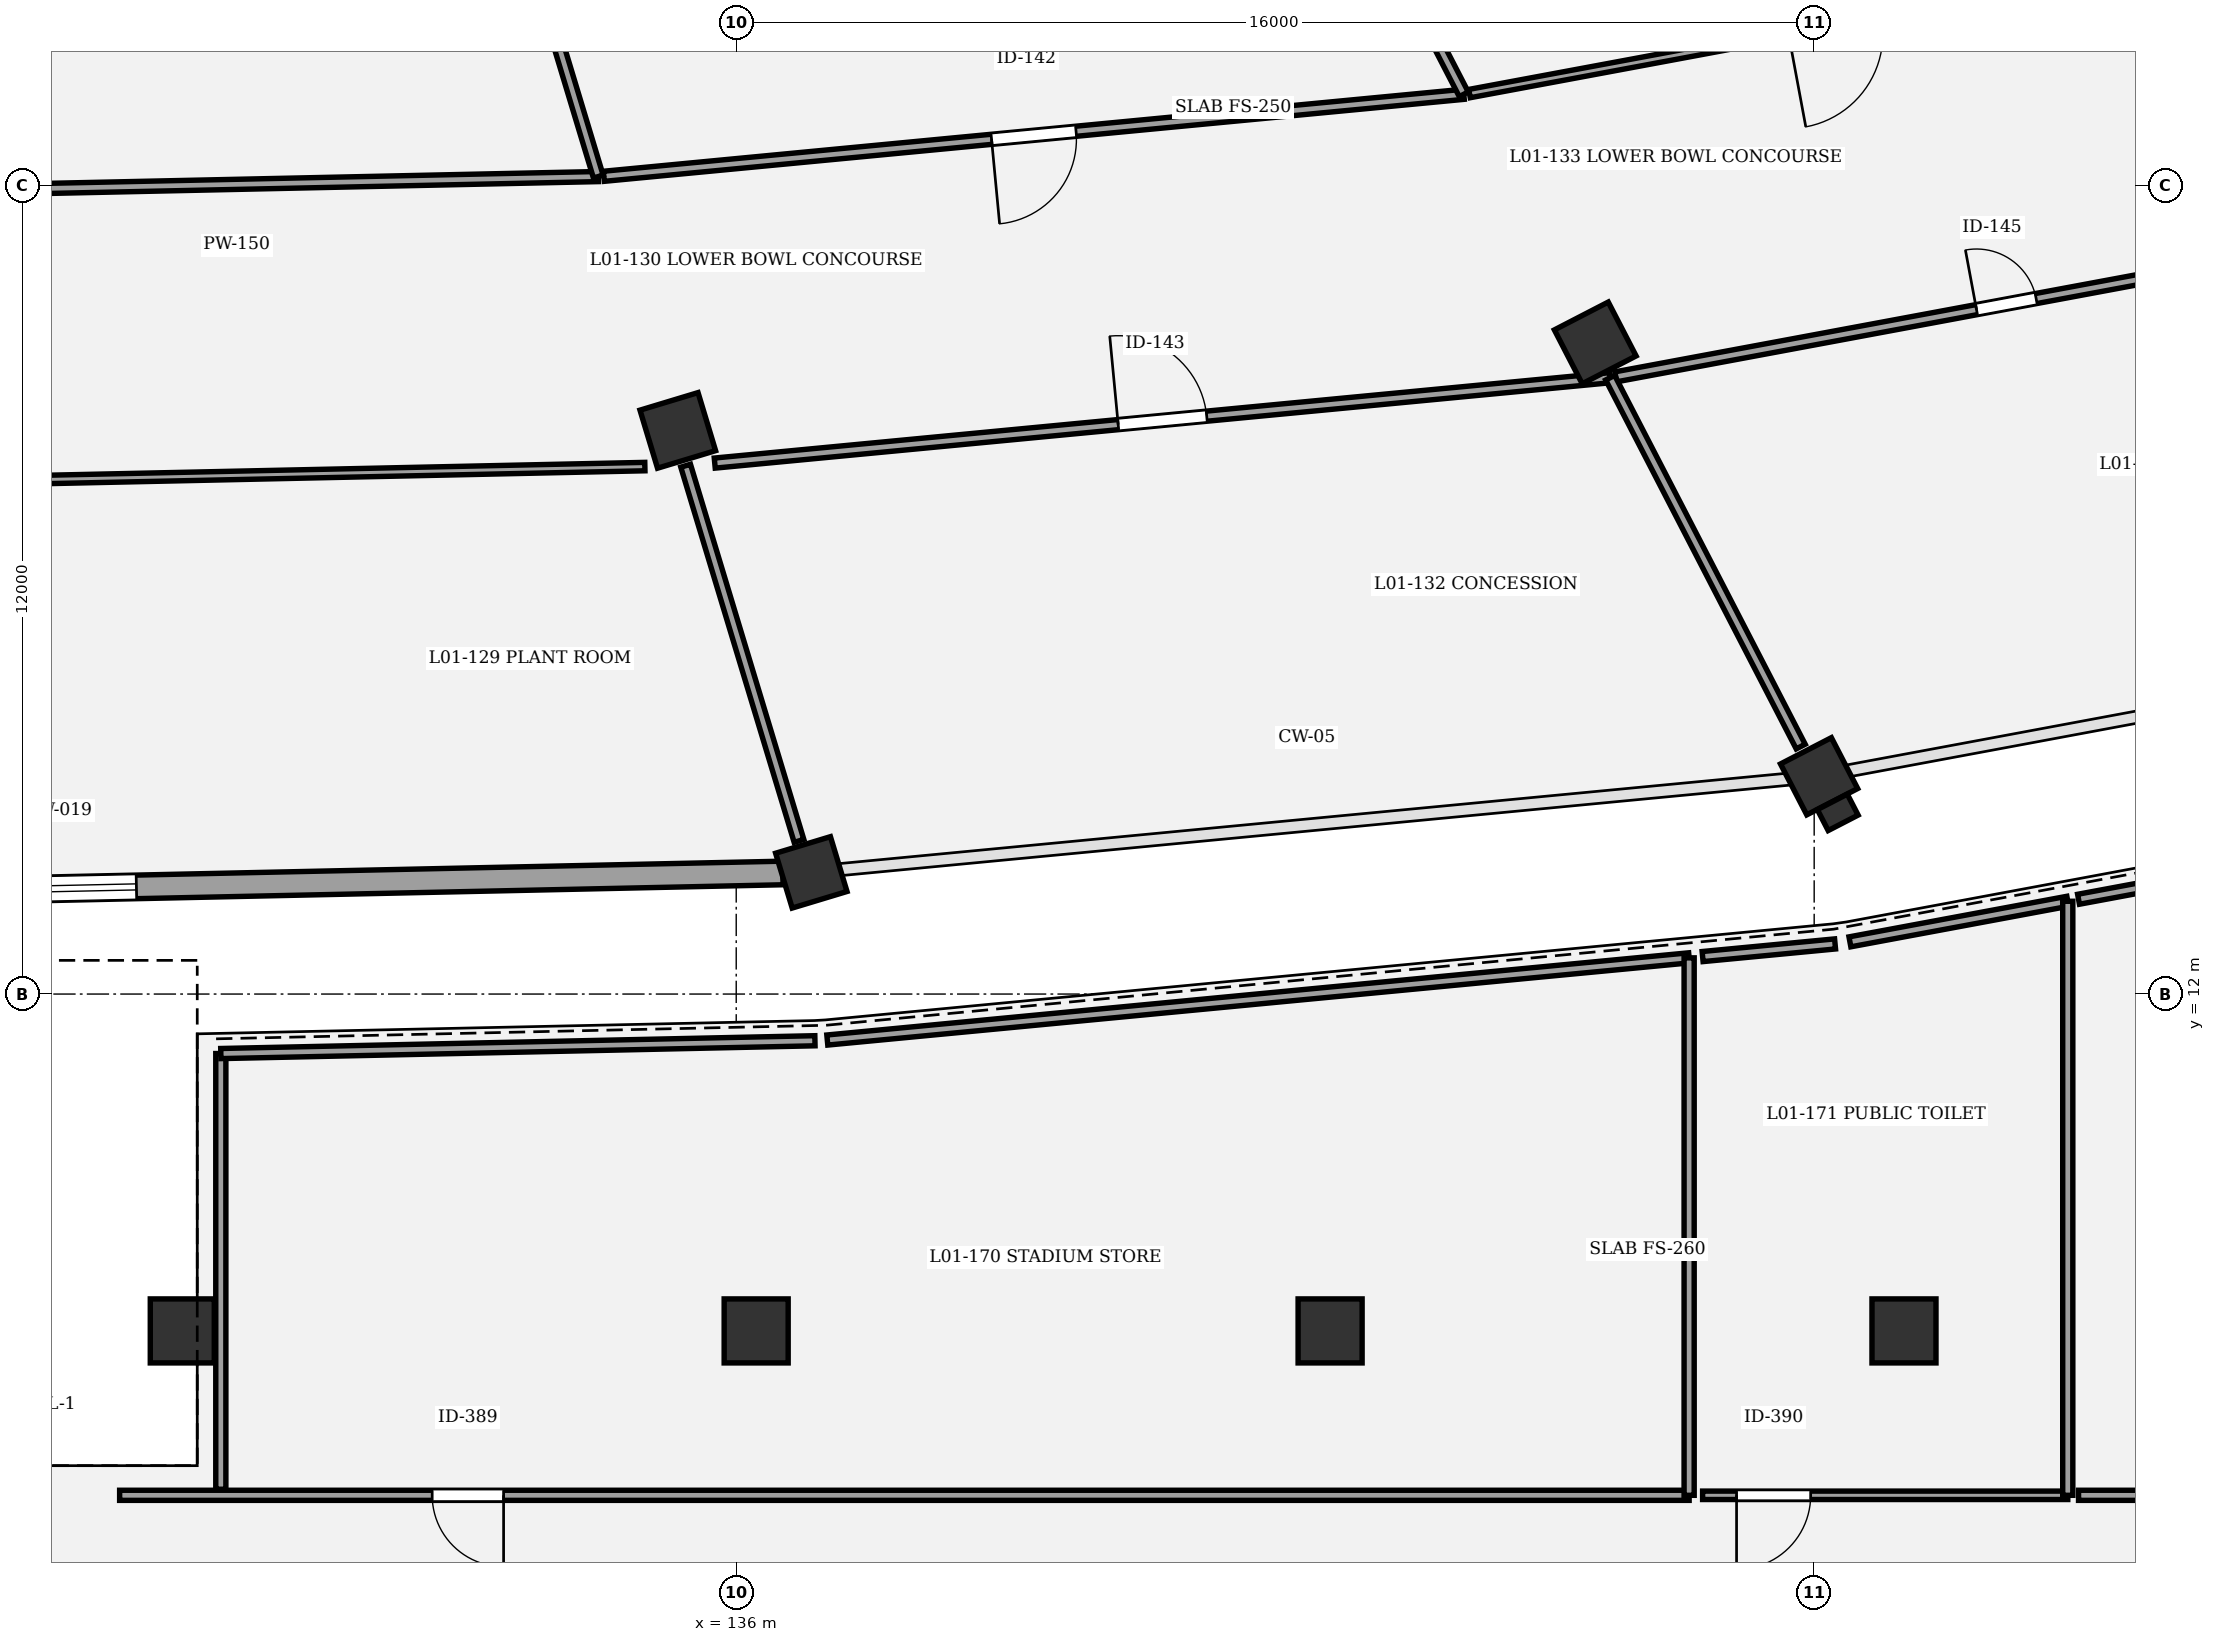
"""IFC4 building model, lengths in metres.
Left out: names, types, materials, properties, quantities, classifications, styles, units other than length and angle.
Written with IfcOpenShell. Run it as: python <this file> out.ifc"""

import sys

from ifc_helpers import new_model, si_unit, direction, frame, frame_2d, origin, origin_2d, place, context, subcontext, project, spatial, rectangle, circle, extrude, element, fill, save


model = new_model("IFC4")
c1 = context("Model", 3, precision=1e-05, world=origin(), true_north=direction((0.0, 1.0)))
c2 = subcontext(c1, "Body", "Model", "MODEL_VIEW")
j1 = project(units=[si_unit("LENGTHUNIT", "METRE"), si_unit("PLANEANGLEUNIT", "RADIAN")], contexts=[c1])
p1 = place(None, origin())
s1 = spatial("IfcSite", under=j1, at=p1, CompositionType="ELEMENT")
p2 = place(p1, origin())
s2 = spatial("IfcBuilding", under=s1, at=p2, CompositionType="ELEMENT")
p3 = place(p2, frame((0.0, 0.0, 5.4)))
s3 = spatial("IfcBuildingStorey", under=s2, at=p3, CompositionType="ELEMENT", Elevation=5.4)
p4 = place(p3, frame((135.133, 20.366, 0.0), z_axis=(0.0, 0.0, 1.0), x_axis=(0.289198876314, -0.957269037387, 0.0)))
e1 = element("IfcColumn", 1, at=p4, inside=s3, PredefinedType="COLUMN", context=c2, shape_type="SweptSolid", body=[
    extrude(rectangle(XDim=0.9, YDim=0.9, at=origin_2d()), origin(), (0.0, 0.0, 1.0), 4.8),
])
p5 = place(p3, frame((137.115, 13.806, 0.0), z_axis=(0.0, 0.0, 1.0), x_axis=(0.289198876314, -0.957269037387, 0.0)))
e2 = element("IfcColumn", 2, at=p5, inside=s3, PredefinedType="COLUMN", context=c2, shape_type="SweptSolid", body=[
    extrude(rectangle(XDim=0.85, YDim=0.85, at=origin_2d()), origin(), (0.0, 0.0, 1.0), 4.8),
])
p6 = place(p3, frame((148.75, 21.665, 0.0), z_axis=(0.0, 0.0, 1.0), x_axis=(0.458959712465, -0.888457079624, 0.0)))
e3 = element("IfcColumn", 3, at=p6, inside=s3, PredefinedType="COLUMN", context=c2, shape_type="SweptSolid", body=[
    extrude(rectangle(XDim=0.9, YDim=0.9, at=origin_2d()), origin(), (0.0, 0.0, 1.0), 4.8),
])
p7 = place(p3, frame((152.073, 15.233, 0.0), z_axis=(0.0, 0.0, 1.0), x_axis=(0.458959712465, -0.888457079624, 0.0)))
e4 = element("IfcColumn", 4, at=p7, inside=s3, PredefinedType="COLUMN", context=c2, shape_type="SweptSolid", body=[
    extrude(rectangle(XDim=0.85, YDim=0.85, at=origin_2d()), origin(), (0.0, 0.0, 1.0), 4.8),
])
p8 = place(p3, frame((152.35, 14.697, 0.0), z_axis=(0.0, 0.0, 1.0), x_axis=(0.888457079624, 0.458959712465, 0.0)))
e5 = element("IfcColumn", 5, at=p8, inside=s3, PredefinedType="PILASTER", context=c2, shape_type="SweptSolid", body=[
    extrude(rectangle(XDim=0.5, YDim=0.35, at=origin_2d()), origin(), (0.0, 0.0, 1.0), 4.8),
])
for number, where, z_axis, x_axis in (
    (6, (127.778, 7.0, 0.0), (0.0, 0.0, 1.0), (1.0, 0.0, 0.0)),
    (7, (136.296, 7.0, 0.0), (0.0, 0.0, 1.0), (1.0, 0.0, 0.0)),
    (8, (144.815, 7.0, 0.0), (0.0, 0.0, 1.0), (1.0, 0.0, 0.0)),
    (9, (153.333, 7.0, 0.0), (0.0, 0.0, 1.0), (1.0, 0.0, 0.0)),
):
    element("IfcColumn", number, at=place(p3, frame(where, z_axis=z_axis, x_axis=x_axis)), inside=s3, PredefinedType="COLUMN", context=c2, shape_type="SweptSolid", body=[
        extrude(circle(Radius=0.475, at=origin_2d()), origin(), (0.0, 0.0, 1.0), 4.8),
    ])
p9 = place(p3, frame((115.423, 13.339, 0.0), z_axis=(0.0, 0.0, 1.0), x_axis=(0.999768218464, 0.021529267282, 0.0)))
e10 = element("IfcWall", 10, at=p9, inside=s3, PredefinedType="STANDARD", context=c2, shape_type="SweptSolid", body=[
    extrude(rectangle(XDim=21.274, YDim=0.35, at=frame_2d((10.637, 0.0))), origin(), (0.0, 0.0, 1.0), 3.57),
])
p10 = place(p9, frame((9.597, 0.0, 0.9)))
e11 = element("IfcOpeningElement", 11, at=p10, cuts=e10, PredefinedType="OPENING", context=c2, shape_type="SweptSolid", body=[
    extrude(rectangle(XDim=2.08, YDim=1.75, at=frame_2d((1.04, 0.875))), frame((0.0, 0.185, 0.0), z_axis=(0.0, -1.0, 0.0), x_axis=(1.0, 0.0, 0.0)), (0.0, 0.0, 1.0), 0.37),
])
p11 = place(p3, frame((133.953, 24.134, 0.0), z_axis=(0.0, 0.0, 1.0), x_axis=(-0.999768266483, -0.021527037261, 0.0)))
e12 = element("IfcWall", 12, at=p11, inside=s3, PredefinedType="PARTITIONING", context=c2, shape_type="SweptSolid", body=[
    extrude(rectangle(XDim=18.917, YDim=0.15, at=frame_2d((9.458, 0.0))), origin(), (0.0, 0.0, 1.0), 3.55),
])
p12 = place(p11, frame((8.868, 0.0, 0.0)))
e13 = element("IfcOpeningElement", 13, at=p12, cuts=e12, PredefinedType="OPENING", context=c2, shape_type="SweptSolid", body=[
    extrude(rectangle(XDim=1.18, YDim=2.3, at=frame_2d((0.59, 1.15))), frame((0.0, 0.085, 0.0), z_axis=(0.0, -1.0, 0.0), x_axis=(1.0, 0.0, 0.0)), (0.0, 0.0, 1.0), 0.17),
])
p13 = place(p3, frame((115.511, 19.417, 0.0), z_axis=(0.0, 0.0, 1.0), x_axis=(0.999768107727, 0.021534409017, 0.0)))
e14 = element("IfcWall", 14, at=p13, inside=s3, PredefinedType="PARTITIONING", context=c2, shape_type="SweptSolid", body=[
    extrude(rectangle(XDim=19.137, YDim=0.125, at=frame_2d((9.569, 0.0))), origin(), (0.0, 0.0, 1.0), 3.55),
])
p14 = place(p13, frame((8.959, 0.0, 0.0)))
e15 = element("IfcOpeningElement", 15, at=p14, cuts=e14, PredefinedType="OPENING", context=c2, shape_type="SweptSolid", body=[
    extrude(rectangle(XDim=1.22, YDim=2.3, at=frame_2d((0.61, 1.15))), frame((0.0, 0.073, 0.0), z_axis=(0.0, -1.0, 0.0), x_axis=(1.0, 0.0, 0.0)), (0.0, 0.0, 1.0), 0.145),
])
p15 = place(p3, frame((146.799, 25.355, 0.0), z_axis=(0.0, 0.0, 1.0), x_axis=(-0.995485111947, -0.094917816515, 0.0)))
e16 = element("IfcWall", 16, at=p15, inside=s3, PredefinedType="PARTITIONING", context=c2, shape_type="SweptSolid", body=[
    extrude(rectangle(XDim=12.822, YDim=0.15, at=frame_2d((6.411, 0.0))), origin(), (0.0, 0.0, 1.0), 3.55),
])
p16 = place(p15, frame((5.781, 0.0, 0.0)))
e17 = element("IfcOpeningElement", 17, at=p16, cuts=e16, PredefinedType="OPENING", context=c2, shape_type="SweptSolid", body=[
    extrude(rectangle(XDim=1.26, YDim=2.3, at=frame_2d((0.63, 1.15))), frame((0.0, 0.085, 0.0), z_axis=(0.0, -1.0, 0.0), x_axis=(1.0, 0.0, 0.0)), (0.0, 0.0, 1.0), 0.17),
])
p17 = place(p3, frame((135.681, 19.881, 0.0), z_axis=(0.0, 0.0, 1.0), x_axis=(0.995484535327, 0.094923863827, 0.0)))
e18 = element("IfcWall", 18, at=p17, inside=s3, PredefinedType="PARTITIONING", context=c2, shape_type="SweptSolid", body=[
    extrude(rectangle(XDim=13.351, YDim=0.15, at=frame_2d((6.676, 0.0))), origin(), (0.0, 0.0, 1.0), 3.55),
])
p18 = place(p17, frame((6.015, 0.0, 0.0)))
e19 = element("IfcOpeningElement", 19, at=p18, cuts=e18, PredefinedType="OPENING", context=c2, shape_type="SweptSolid", body=[
    extrude(rectangle(XDim=1.32, YDim=2.3, at=frame_2d((0.66, 1.15))), frame((0.0, 0.085, 0.0), z_axis=(0.0, -1.0, 0.0), x_axis=(1.0, 0.0, 0.0)), (0.0, 0.0, 1.0), 0.17),
])
p19 = place(p3, frame((157.732, 27.386, 0.0), z_axis=(0.0, 0.0, 1.0), x_axis=(-0.983097372707, -0.183083466695, 0.0)))
e20 = element("IfcWall", 20, at=p19, inside=s3, PredefinedType="PARTITIONING", context=c2, shape_type="SweptSolid", body=[
    extrude(rectangle(XDim=11.035, YDim=0.125, at=frame_2d((5.517, 0.0))), origin(), (0.0, 0.0, 1.0), 3.55),
])
p20 = place(p19, frame((4.817, 0.0, 0.0)))
e21 = element("IfcOpeningElement", 21, at=p20, cuts=e20, PredefinedType="OPENING", context=c2, shape_type="SweptSolid", body=[
    extrude(rectangle(XDim=1.4, YDim=2.3, at=frame_2d((0.7, 1.15))), frame((0.0, 0.073, 0.0), z_axis=(0.0, -1.0, 0.0), x_axis=(1.0, 0.0, 0.0)), (0.0, 0.0, 1.0), 0.145),
])
p21 = place(p3, frame((149.055, 21.161, 0.0), z_axis=(0.0, 0.0, 1.0), x_axis=(0.983095748229, 0.183092189385, 0.0)))
e22 = element("IfcWall", 22, at=p21, inside=s3, PredefinedType="PARTITIONING", context=c2, shape_type="SweptSolid", body=[
    extrude(rectangle(XDim=11.793, YDim=0.15, at=frame_2d((5.896, 0.0))), origin(), (0.0, 0.0, 1.0), 3.55),
])
p22 = place(p21, frame((5.447, 0.0, 0.0)))
e23 = element("IfcOpeningElement", 23, at=p22, cuts=e22, PredefinedType="OPENING", context=c2, shape_type="SweptSolid", body=[
    extrude(rectangle(XDim=0.9, YDim=2.1, at=frame_2d((0.45, 1.05))), frame((0.0, 0.085, 0.0), z_axis=(0.0, -1.0, 0.0), x_axis=(1.0, 0.0, 0.0)), (0.0, 0.0, 1.0), 0.17),
])
p23 = place(p3, frame((150.144, 4.56, 0.0), z_axis=(0.0, 0.0, 1.0), x_axis=(-1.0, 0.0, 0.0)))
e24 = element("IfcWall", 24, at=p23, inside=s3, PredefinedType="PARTITIONING", context=c2, shape_type="SweptSolid", body=[
    extrude(rectangle(XDim=23.296, YDim=0.15, at=frame_2d((11.648, 0.0))), origin(), (0.0, 0.0, 1.0), 3.55),
])
p24 = place(p23, frame((17.597, 0.0, 0.0)))
e25 = element("IfcOpeningElement", 25, at=p24, cuts=e24, PredefinedType="OPENING", context=c2, shape_type="SweptSolid", body=[
    extrude(rectangle(XDim=1.06, YDim=2.3, at=frame_2d((0.53, 1.15))), frame((0.0, 0.085, 0.0), z_axis=(0.0, -1.0, 0.0), x_axis=(1.0, 0.0, 0.0)), (0.0, 0.0, 1.0), 0.17),
])
p25 = place(p3, frame((155.764, 4.56, 0.0), z_axis=(0.0, 0.0, 1.0), x_axis=(-1.0, 0.0, 0.0)))
e26 = element("IfcWall", 26, at=p25, inside=s3, PredefinedType="PARTITIONING", context=c2, shape_type="SweptSolid", body=[
    extrude(rectangle(XDim=5.42, YDim=0.125, at=frame_2d((2.71, 0.0))), origin(), (0.0, 0.0, 1.0), 3.55),
])
p26 = place(p25, frame((3.816, 0.0, 0.0)))
e27 = element("IfcOpeningElement", 27, at=p26, cuts=e26, PredefinedType="OPENING", context=c2, shape_type="SweptSolid", body=[
    extrude(rectangle(XDim=1.1, YDim=2.3, at=frame_2d((0.55, 1.15))), frame((0.0, 0.073, 0.0), z_axis=(0.0, -1.0, 0.0), x_axis=(1.0, 0.0, 0.0)), (0.0, 0.0, 1.0), 0.145),
])
p27 = place(p3, frame((173.64, 4.56, 0.0), z_axis=(0.0, 0.0, 1.0), x_axis=(-1.0, 0.0, 0.0)))
e28 = element("IfcWall", 28, at=p27, inside=s3, PredefinedType="PARTITIONING", context=c2, shape_type="SweptSolid", body=[
    extrude(rectangle(XDim=17.716, YDim=0.15, at=frame_2d((8.858, 0.0))), origin(), (0.0, 0.0, 1.0), 3.55),
])
p28 = place(p27, frame((15.459, 0.0, 0.0)))
e29 = element("IfcOpeningElement", 29, at=p28, cuts=e28, PredefinedType="OPENING", context=c2, shape_type="SweptSolid", body=[
    extrude(rectangle(XDim=1.14, YDim=2.3, at=frame_2d((0.57, 1.15))), frame((0.0, 0.085, 0.0), z_axis=(0.0, -1.0, 0.0), x_axis=(1.0, 0.0, 0.0)), (0.0, 0.0, 1.0), 0.17),
])
p29 = place(p3, frame((131.995, 30.614, 0.0), z_axis=(0.0, 0.0, 1.0), x_axis=(0.289226587364, -0.957260665212, 0.0)))
e30 = element("IfcWall", 30, at=p29, inside=s3, PredefinedType="PARTITIONING", context=c2, shape_type="SweptSolid", body=[
    extrude(rectangle(XDim=6.77, YDim=0.15, at=frame_2d((3.385, 0.0))), origin(), (0.0, 0.0, 1.0), 3.55),
])
p30 = place(p3, frame((135.249, 19.842, 0.0), z_axis=(0.0, 0.0, 1.0), x_axis=(0.289195444178, -0.957270074256, 0.0)))
e31 = element("IfcWall", 31, at=p30, inside=s3, PredefinedType="PARTITIONING", context=c2, shape_type="SweptSolid", body=[
    extrude(rectangle(XDim=5.817, YDim=0.15, at=frame_2d((2.909, 0.0))), origin(), (0.0, 0.0, 1.0), 3.55),
])
p31 = place(p3, frame((143.516, 31.71, 0.0), z_axis=(0.0, 0.0, 1.0), x_axis=(0.458942826051, -0.888465802615, 0.0)))
e32 = element("IfcWall", 32, at=p31, inside=s3, PredefinedType="PARTITIONING", context=c2, shape_type="SweptSolid", body=[
    extrude(rectangle(XDim=7.153, YDim=0.15, at=frame_2d((3.577, 0.0))), origin(), (0.0, 0.0, 1.0), 3.55),
])
p32 = place(p3, frame((148.972, 21.148, 0.0), z_axis=(0.0, 0.0, 1.0), x_axis=(0.45896480759, -0.888454447563, 0.0)))
e33 = element("IfcWall", 33, at=p32, inside=s3, PredefinedType="PARTITIONING", context=c2, shape_type="SweptSolid", body=[
    extrude(rectangle(XDim=6.163, YDim=0.15, at=frame_2d((3.081, 0.0))), origin(), (0.0, 0.0, 1.0), 3.55),
])
p33 = place(p3, frame((128.35, 4.65, 0.0), z_axis=(0.0, 0.0, 1.0), x_axis=(0.0, 1.0, 0.0)))
e34 = element("IfcWall", 34, at=p33, inside=s3, PredefinedType="PARTITIONING", context=c2, shape_type="SweptSolid", body=[
    extrude(rectangle(XDim=6.467, YDim=0.15, at=frame_2d((3.233, 0.0))), origin(), (0.0, 0.0, 1.0), 3.55),
])
p34 = place(p3, frame((128.35, 11.117, 0.0), z_axis=(0.0, 0.0, 1.0), x_axis=(0.999768109674, 0.021534318641, 0.0)))
e35 = element("IfcWall", 35, at=p34, inside=s3, PredefinedType="PARTITIONING", context=c2, shape_type="SweptSolid", body=[
    extrude(rectangle(XDim=8.82, YDim=0.15, at=frame_2d((4.41, 0.0))), origin(), (0.0, 0.0, 1.0), 3.55),
])
p35 = place(p3, frame((137.352, 11.317, 0.0), z_axis=(0.0, 0.0, 1.0), x_axis=(0.995483253835, 0.094937302124, 0.0)))
e36 = element("IfcWall", 36, at=p35, inside=s3, PredefinedType="PARTITIONING", context=c2, shape_type="SweptSolid", body=[
    extrude(rectangle(XDim=12.85, YDim=0.15, at=frame_2d((6.425, 0.0))), origin(), (0.0, 0.0, 1.0), 3.55),
])
p36 = place(p3, frame((150.144, 12.537, 0.0), z_axis=(0.0, 0.0, 1.0), x_axis=(0.0, -1.0, 0.0)))
e37 = element("IfcWall", 37, at=p36, inside=s3, PredefinedType="PARTITIONING", context=c2, shape_type="SweptSolid", body=[
    extrude(rectangle(XDim=7.977, YDim=0.15, at=frame_2d((3.989, 0.0))), origin(), (0.0, 0.0, 1.0), 3.55),
])
p37 = place(p3, frame((152.531, 12.775, 0.0), z_axis=(0.0, 0.0, 1.0), x_axis=(0.983089981796, 0.18312314898, 0.0)))
e38 = element("IfcWall", 38, at=p37, inside=s3, PredefinedType="PARTITIONING", context=c2, shape_type="SweptSolid", body=[
    extrude(rectangle(XDim=3.289, YDim=0.15, at=frame_2d((1.645, 0.0))), origin(), (0.0, 0.0, 1.0), 3.55),
])
p38 = place(p3, frame((155.764, 13.377, 0.0), z_axis=(0.0, 0.0, 1.0), x_axis=(0.0, -1.0, 0.0)))
e39 = element("IfcWall", 39, at=p38, inside=s3, PredefinedType="PARTITIONING", context=c2, shape_type="SweptSolid", body=[
    extrude(rectangle(XDim=8.817, YDim=0.15, at=frame_2d((4.409, 0.0))), origin(), (0.0, 0.0, 1.0), 3.55),
])
p39 = place(p3, frame((150.344, 12.556, 0.0), z_axis=(0.0, 0.0, 1.0), x_axis=(0.995483241572, 0.094937430712, 0.0)))
e40 = element("IfcWall", 40, at=p39, inside=s3, PredefinedType="PARTITIONING", context=c2, shape_type="SweptSolid", body=[
    extrude(rectangle(XDim=1.975, YDim=0.15, at=frame_2d((0.988, 0.0))), origin(), (0.0, 0.0, 1.0), 3.55),
])
p40 = place(p3, frame((155.924, 13.407, 0.0), z_axis=(0.0, 0.0, 1.0), x_axis=(0.983095301178, 0.183094589766, 0.0)))
e41 = element("IfcWall", 41, at=p40, inside=s3, PredefinedType="PARTITIONING", context=c2, shape_type="SweptSolid", body=[
    extrude(rectangle(XDim=9.495, YDim=0.15, at=frame_2d((4.748, 0.0))), origin(), (0.0, 0.0, 1.0), 3.55),
])
p41 = place(p10, origin())
e42 = element("IfcWindow", 42, at=p41, inside=s3, PartitioningType="SINGLE_PANEL", PredefinedType="WINDOW", context=c2, shape_type="SweptSolid", body=[
    extrude(rectangle(XDim=2.08, YDim=1.75, at=frame_2d((1.04, 0.875))), frame((0.0, 0.03, 0.0), z_axis=(0.0, -1.0, 0.0), x_axis=(1.0, 0.0, 0.0)), (0.0, 0.0, 1.0), 0.06),
])
fill(e11, e42)
p42 = place(p16, origin())
e43 = element("IfcDoor", 43, at=p42, inside=s3, OperationType="SINGLE_SWING_RIGHT", PredefinedType="DOOR", context=c2, shape_type="SweptSolid", body=[
    extrude(rectangle(XDim=1.26, YDim=2.3, at=frame_2d((0.63, 1.15))), frame((0.0, 0.025, 0.0), z_axis=(0.0, -1.0, 0.0), x_axis=(1.0, 0.0, 0.0)), (0.0, 0.0, 1.0), 0.05),
])
fill(e17, e43)
p43 = place(p18, origin())
e44 = element("IfcDoor", 44, at=p43, inside=s3, OperationType="SINGLE_SWING_LEFT", PredefinedType="DOOR", context=c2, shape_type="SweptSolid", body=[
    extrude(rectangle(XDim=1.32, YDim=2.3, at=frame_2d((0.66, 1.15))), frame((0.0, 0.025, 0.0), z_axis=(0.0, -1.0, 0.0), x_axis=(1.0, 0.0, 0.0)), (0.0, 0.0, 1.0), 0.05),
])
fill(e19, e44)
p44 = place(p22, origin())
e45 = element("IfcDoor", 45, at=p44, inside=s3, OperationType="SINGLE_SWING_LEFT", PredefinedType="DOOR", context=c2, shape_type="SweptSolid", body=[
    extrude(rectangle(XDim=0.9, YDim=2.1, at=frame_2d((0.45, 1.05))), frame((0.0, 0.025, 0.0), z_axis=(0.0, -1.0, 0.0), x_axis=(1.0, 0.0, 0.0)), (0.0, 0.0, 1.0), 0.05),
])
fill(e23, e45)
p45 = place(p24, origin())
e46 = element("IfcDoor", 46, at=p45, inside=s3, OperationType="SINGLE_SWING_LEFT", PredefinedType="DOOR", context=c2, shape_type="SweptSolid", body=[
    extrude(rectangle(XDim=1.06, YDim=2.3, at=frame_2d((0.53, 1.15))), frame((0.0, 0.025, 0.0), z_axis=(0.0, -1.0, 0.0), x_axis=(1.0, 0.0, 0.0)), (0.0, 0.0, 1.0), 0.05),
])
fill(e25, e46)
p46 = place(p26, origin())
e47 = element("IfcDoor", 47, at=p46, inside=s3, OperationType="SINGLE_SWING_RIGHT", PredefinedType="DOOR", context=c2, shape_type="SweptSolid", body=[
    extrude(rectangle(XDim=1.1, YDim=2.3, at=frame_2d((0.55, 1.15))), frame((0.0, 0.025, 0.0), z_axis=(0.0, -1.0, 0.0), x_axis=(1.0, 0.0, 0.0)), (0.0, 0.0, 1.0), 0.05),
])
fill(e27, e47)
save(model, sys.argv[1])
